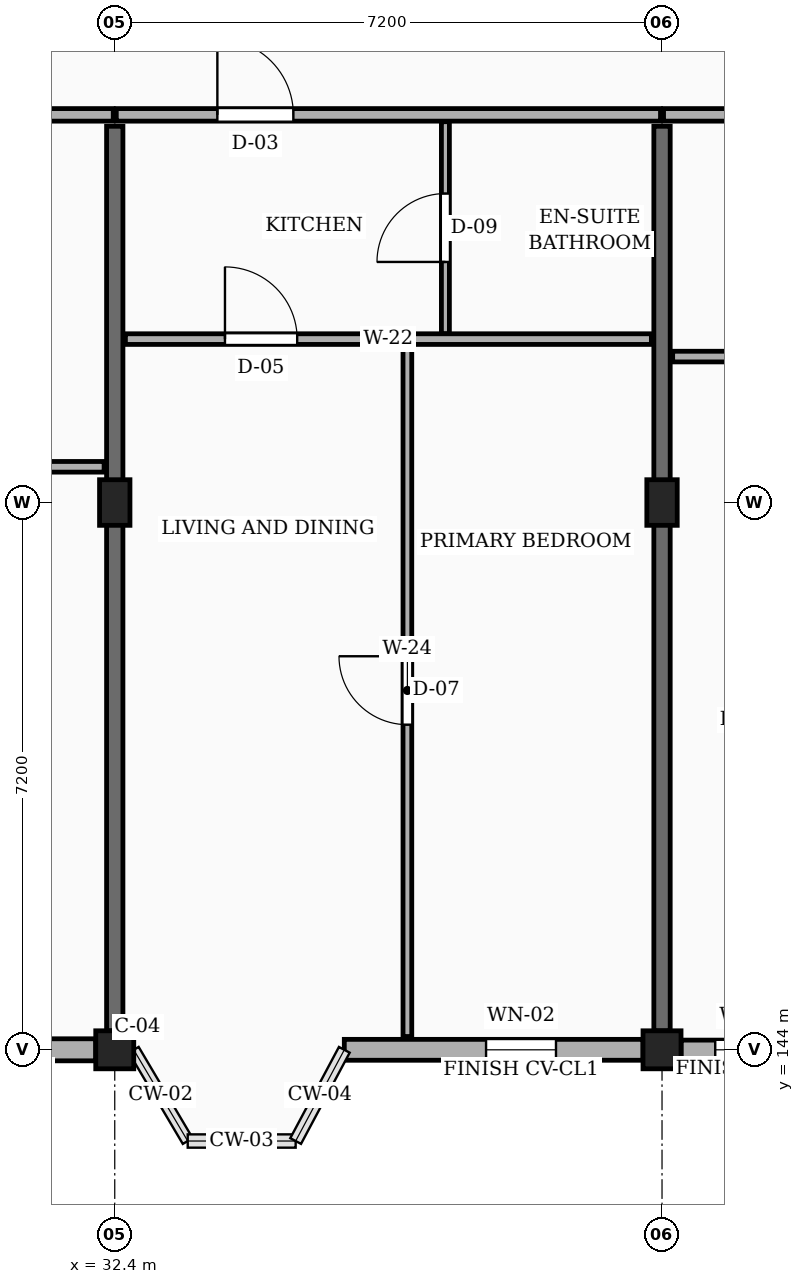
"""IFC4 building model, lengths in metres.
Left out: names, types, materials, properties, quantities, classifications, styles, units other than length and angle.
Written with IfcOpenShell. Run it as: python <this file> out.ifc"""

import sys

from ifc_helpers import new_model, si_unit, direction, frame, frame_2d, origin, origin_2d, place, context, subcontext, project, spatial, rectangle, extrude, element, fill, save


model = new_model("IFC4")
c1 = context("Model", 3, precision=1e-05, world=origin(), true_north=direction((0.0, 1.0)))
c2 = subcontext(c1, "Body", "Model", "MODEL_VIEW")
j1 = project(units=[si_unit("LENGTHUNIT", "METRE"), si_unit("PLANEANGLEUNIT", "RADIAN")], contexts=[c1])
p1 = place(None, origin())
s1 = spatial("IfcSite", under=j1, at=p1, CompositionType="ELEMENT")
p2 = place(p1, origin())
s2 = spatial("IfcBuilding", under=s1, at=p2, CompositionType="ELEMENT")
p3 = place(p2, frame((0.0, 0.0, 26.55)))
s3 = spatial("IfcBuildingStorey", under=s2, at=p3, CompositionType="ELEMENT", Elevation=26.55)
p4 = place(p3, frame((32.4, 144.0, 0.0), z_axis=(0.0, 0.0, 1.0), x_axis=(1.0, 0.0, 0.0)))
e1 = element("IfcColumn", 1, at=p4, inside=s3, PredefinedType="COLUMN", context=c2, shape_type="SweptSolid", body=[
    extrude(rectangle(XDim=0.5, YDim=0.5, at=origin_2d()), origin(), (0.0, 0.0, 1.0), 3.15),
])
p5 = place(p3, frame((32.4, 151.2, 0.0), z_axis=(0.0, 0.0, 1.0), x_axis=(1.0, 0.0, 0.0)))
e2 = element("IfcColumn", 2, at=p5, inside=s3, PredefinedType="COLUMN", context=c2, shape_type="SweptSolid", body=[
    extrude(rectangle(XDim=0.4, YDim=0.6, at=origin_2d()), origin(), (0.0, 0.0, 1.0), 3.15),
])
p6 = place(p3, frame((39.6, 144.0, 0.0), z_axis=(0.0, 0.0, 1.0), x_axis=(1.0, 0.0, 0.0)))
e3 = element("IfcColumn", 3, at=p6, inside=s3, PredefinedType="COLUMN", context=c2, shape_type="SweptSolid", body=[
    extrude(rectangle(XDim=0.5, YDim=0.5, at=origin_2d()), origin(), (0.0, 0.0, 1.0), 3.15),
])
p7 = place(p3, frame((39.6, 151.2, 0.0), z_axis=(0.0, 0.0, 1.0), x_axis=(1.0, 0.0, 0.0)))
e4 = element("IfcColumn", 4, at=p7, inside=s3, PredefinedType="COLUMN", context=c2, shape_type="SweptSolid", body=[
    extrude(rectangle(XDim=0.4, YDim=0.6, at=origin_2d()), origin(), (0.0, 0.0, 1.0), 3.15),
])
for number, where, z_axis, x_axis in (
    (5, (32.4, 144.25, 0.0), (0.0, 0.0, 1.0), (0.0, 1.0, 0.0)),
    (6, (39.6, 144.25, 0.0), (0.0, 0.0, 1.0), (0.0, 1.0, 0.0)),
):
    element("IfcWall", number, at=place(p3, frame(where, z_axis=z_axis, x_axis=x_axis)), inside=s3, PredefinedType="SOLIDWALL", context=c2, shape_type="SweptSolid", body=[
        extrude(rectangle(XDim=11.9, YDim=0.215, at=frame_2d((5.95, 0.0))), origin(), (0.0, 0.0, 1.0), 2.185),
    ])
p8 = place(p3, frame((25.45, 144.0, 0.0), z_axis=(0.0, 0.0, 1.0), x_axis=(1.0, 0.0, 0.0)))
e7 = element("IfcWall", 7, at=p8, inside=s3, PredefinedType="SOLIDWALL", context=c2, shape_type="SweptSolid", body=[
    extrude(rectangle(XDim=6.7, YDim=0.29, at=frame_2d((3.35, 0.0))), origin(), (0.0, 0.0, 1.0), 2.455),
])
p9 = place(p8, frame((0.45, 0.0, 0.78)))
e8 = element("IfcOpeningElement", 8, at=p9, cuts=e7, PredefinedType="OPENING", context=c2, shape_type="SweptSolid", body=[
    extrude(rectangle(XDim=1.45, YDim=1.44, at=frame_2d((0.725, 0.72))), frame((0.0, 0.155, 0.0), z_axis=(0.0, -1.0, 0.0), x_axis=(1.0, 0.0, 0.0)), (0.0, 0.0, 1.0), 0.31),
])
p10 = place(p8, frame((4.65, 0.0, 0.78)))
e9 = element("IfcOpeningElement", 9, at=p10, cuts=e7, PredefinedType="OPENING", context=c2, shape_type="SweptSolid", body=[
    extrude(rectangle(XDim=0.92, YDim=1.15, at=frame_2d((0.46, 0.575))), frame((0.0, 0.155, 0.0), z_axis=(0.0, -1.0, 0.0), x_axis=(1.0, 0.0, 0.0)), (0.0, 0.0, 1.0), 0.31),
])
p11 = place(p3, frame((35.42, 144.0, 0.0), z_axis=(0.0, 0.0, 1.0), x_axis=(1.0, 0.0, 0.0)))
e10 = element("IfcWall", 10, at=p11, inside=s3, PredefinedType="SOLIDWALL", context=c2, shape_type="SweptSolid", body=[
    extrude(rectangle(XDim=3.93, YDim=0.275, at=frame_2d((1.965, 0.0))), origin(), (0.0, 0.0, 1.0), 2.455),
])
p12 = place(p11, frame((1.865, 0.0, 0.78)))
e11 = element("IfcOpeningElement", 11, at=p12, cuts=e10, PredefinedType="OPENING", context=c2, shape_type="SweptSolid", body=[
    extrude(rectangle(XDim=0.92, YDim=1.15, at=frame_2d((0.46, 0.575))), frame((0.0, 0.147, 0.0), z_axis=(0.0, -1.0, 0.0), x_axis=(1.0, 0.0, 0.0)), (0.0, 0.0, 1.0), 0.295),
])
p13 = place(p3, frame((39.85, 144.0, 0.0), z_axis=(0.0, 0.0, 1.0), x_axis=(1.0, 0.0, 0.0)))
e12 = element("IfcWall", 12, at=p13, inside=s3, PredefinedType="SOLIDWALL", context=c2, shape_type="SweptSolid", body=[
    extrude(rectangle(XDim=6.7, YDim=0.255, at=frame_2d((3.35, 0.0))), origin(), (0.0, 0.0, 1.0), 2.455),
])
p14 = place(p13, frame((0.45, 0.0, 0.78)))
e13 = element("IfcOpeningElement", 13, at=p14, cuts=e12, PredefinedType="OPENING", context=c2, shape_type="SweptSolid", body=[
    extrude(rectangle(XDim=1.0, YDim=1.15, at=frame_2d((0.5, 0.575))), frame((0.0, 0.137, 0.0), z_axis=(0.0, -1.0, 0.0), x_axis=(1.0, 0.0, 0.0)), (0.0, 0.0, 1.0), 0.275),
])
p15 = place(p13, frame((4.65, 0.0, 0.78)))
e14 = element("IfcOpeningElement", 14, at=p15, cuts=e12, PredefinedType="OPENING", context=c2, shape_type="SweptSolid", body=[
    extrude(rectangle(XDim=1.16, YDim=1.15, at=frame_2d((0.58, 0.575))), frame((0.0, 0.137, 0.0), z_axis=(0.0, -1.0, 0.0), x_axis=(1.0, 0.0, 0.0)), (0.0, 0.0, 1.0), 0.275),
])
p16 = place(p3, frame((25.22, 156.3, 0.0), z_axis=(0.0, 0.0, 1.0), x_axis=(1.0, 0.0, 0.0)))
e15 = element("IfcWall", 15, at=p16, inside=s3, PredefinedType="PARTITIONING", context=c2, shape_type="SweptSolid", body=[
    extrude(rectangle(XDim=7.16, YDim=0.165, at=frame_2d((3.58, 0.0))), origin(), (0.0, 0.0, 1.0), 2.32),
])
p17 = place(p16, frame((4.78, 0.0, 0.0)))
e16 = element("IfcOpeningElement", 16, at=p17, cuts=e15, PredefinedType="OPENING", context=c2, shape_type="SweptSolid", body=[
    extrude(rectangle(XDim=1.14, YDim=2.18, at=frame_2d((0.57, 1.09))), frame((0.0, 0.093, 0.0), z_axis=(0.0, -1.0, 0.0), x_axis=(1.0, 0.0, 0.0)), (0.0, 0.0, 1.0), 0.185),
])
p18 = place(p3, frame((32.42, 156.3, 0.0), z_axis=(0.0, 0.0, 1.0), x_axis=(1.0, 0.0, 0.0)))
e17 = element("IfcWall", 17, at=p18, inside=s3, PredefinedType="PARTITIONING", context=c2, shape_type="SweptSolid", body=[
    extrude(rectangle(XDim=7.16, YDim=0.165, at=frame_2d((3.58, 0.0))), origin(), (0.0, 0.0, 1.0), 2.32),
])
p19 = place(p18, frame((1.33, 0.0, 0.0)))
e18 = element("IfcOpeningElement", 18, at=p19, cuts=e17, PredefinedType="OPENING", context=c2, shape_type="SweptSolid", body=[
    extrude(rectangle(XDim=1.0, YDim=2.15, at=frame_2d((0.5, 1.075))), frame((0.0, 0.093, 0.0), z_axis=(0.0, -1.0, 0.0), x_axis=(1.0, 0.0, 0.0)), (0.0, 0.0, 1.0), 0.185),
])
p20 = place(p3, frame((39.62, 156.3, 0.0), z_axis=(0.0, 0.0, 1.0), x_axis=(1.0, 0.0, 0.0)))
e19 = element("IfcWall", 19, at=p20, inside=s3, PredefinedType="PARTITIONING", context=c2, shape_type="SweptSolid", body=[
    extrude(rectangle(XDim=7.16, YDim=0.165, at=frame_2d((3.58, 0.0))), origin(), (0.0, 0.0, 1.0), 2.32),
])
p21 = place(p20, frame((1.33, 0.0, 0.0)))
e20 = element("IfcOpeningElement", 20, at=p21, cuts=e19, PredefinedType="OPENING", context=c2, shape_type="SweptSolid", body=[
    extrude(rectangle(XDim=0.94, YDim=2.12, at=frame_2d((0.47, 1.06))), frame((0.0, 0.093, 0.0), z_axis=(0.0, -1.0, 0.0), x_axis=(1.0, 0.0, 0.0)), (0.0, 0.0, 1.0), 0.185),
])
p22 = place(p3, frame((25.34, 151.67, 0.0), z_axis=(0.0, 0.0, 1.0), x_axis=(1.0, 0.0, 0.0)))
e21 = element("IfcWall", 21, at=p22, inside=s3, PredefinedType="PARTITIONING", context=c2, shape_type="SweptSolid", body=[
    extrude(rectangle(XDim=6.92, YDim=0.14, at=frame_2d((3.46, 0.0))), origin(), (0.0, 0.0, 1.0), 2.32),
])
p23 = place(p22, frame((4.66, 0.0, 0.0)))
e22 = element("IfcOpeningElement", 22, at=p23, cuts=e21, PredefinedType="OPENING", context=c2, shape_type="SweptSolid", body=[
    extrude(rectangle(XDim=0.95, YDim=2.1, at=frame_2d((0.475, 1.05))), frame((0.0, 0.08, 0.0), z_axis=(0.0, -1.0, 0.0), x_axis=(1.0, 0.0, 0.0)), (0.0, 0.0, 1.0), 0.16),
])
p24 = place(p3, frame((36.25, 144.175, 0.0), z_axis=(0.0, 0.0, 1.0), x_axis=(0.0, 1.0, 0.0)))
e23 = element("IfcWall", 23, at=p24, inside=s3, PredefinedType="PARTITIONING", context=c2, shape_type="SweptSolid", body=[
    extrude(rectangle(XDim=9.105, YDim=0.115, at=frame_2d((4.552, 0.0))), origin(), (0.0, 0.0, 1.0), 2.32),
])
p25 = place(p24, frame((4.103, 0.0, 0.0)))
e24 = element("IfcOpeningElement", 24, at=p25, cuts=e23, PredefinedType="OPENING", context=c2, shape_type="SweptSolid", body=[
    extrude(rectangle(XDim=0.9, YDim=2.1, at=frame_2d((0.45, 1.05))), frame((0.0, 0.067, 0.0), z_axis=(0.0, -1.0, 0.0), x_axis=(1.0, 0.0, 0.0)), (0.0, 0.0, 1.0), 0.135),
])
p26 = place(p3, frame((36.75, 153.42, 0.0), z_axis=(0.0, 0.0, 1.0), x_axis=(0.0, 1.0, 0.0)))
e25 = element("IfcWall", 25, at=p26, inside=s3, PredefinedType="PARTITIONING", context=c2, shape_type="SweptSolid", body=[
    extrude(rectangle(XDim=2.79, YDim=0.105, at=frame_2d((1.395, 0.0))), origin(), (0.0, 0.0, 1.0), 2.32),
])
p27 = place(p26, frame((0.945, 0.0, 0.0)))
e26 = element("IfcOpeningElement", 26, at=p27, cuts=e25, PredefinedType="OPENING", context=c2, shape_type="SweptSolid", body=[
    extrude(rectangle(XDim=0.9, YDim=2.05, at=frame_2d((0.45, 1.025))), frame((0.0, 0.062, 0.0), z_axis=(0.0, -1.0, 0.0), x_axis=(1.0, 0.0, 0.0)), (0.0, 0.0, 1.0), 0.125),
])
p28 = place(p3, frame((32.54, 153.35, 0.0), z_axis=(0.0, 0.0, 1.0), x_axis=(1.0, 0.0, 0.0)))
e27 = element("IfcWall", 27, at=p28, inside=s3, PredefinedType="PARTITIONING", context=c2, shape_type="SweptSolid", body=[
    extrude(rectangle(XDim=6.92, YDim=0.14, at=frame_2d((3.46, 0.0))), origin(), (0.0, 0.0, 1.0), 2.32),
])
p29 = place(p28, frame((1.31, 0.0, 0.0)))
e28 = element("IfcOpeningElement", 28, at=p29, cuts=e27, PredefinedType="OPENING", context=c2, shape_type="SweptSolid", body=[
    extrude(rectangle(XDim=0.95, YDim=2.1, at=frame_2d((0.475, 1.05))), frame((0.0, 0.08, 0.0), z_axis=(0.0, -1.0, 0.0), x_axis=(1.0, 0.0, 0.0)), (0.0, 0.0, 1.0), 0.16),
])
p30 = place(p3, frame((39.74, 153.12, 0.0), z_axis=(0.0, 0.0, 1.0), x_axis=(1.0, 0.0, 0.0)))
e29 = element("IfcWall", 29, at=p30, inside=s3, PredefinedType="PARTITIONING", context=c2, shape_type="SweptSolid", body=[
    extrude(rectangle(XDim=6.92, YDim=0.14, at=frame_2d((3.46, 0.0))), origin(), (0.0, 0.0, 1.0), 2.32),
])
p31 = place(p30, frame((1.31, 0.0, 0.0)))
e30 = element("IfcOpeningElement", 30, at=p31, cuts=e29, PredefinedType="OPENING", context=c2, shape_type="SweptSolid", body=[
    extrude(rectangle(XDim=0.92, YDim=2.1, at=frame_2d((0.46, 1.05))), frame((0.0, 0.08, 0.0), z_axis=(0.0, -1.0, 0.0), x_axis=(1.0, 0.0, 0.0)), (0.0, 0.0, 1.0), 0.16),
])
p32 = place(p12, origin())
e31 = element("IfcWindow", 31, at=p32, inside=s3, PartitioningType="SINGLE_PANEL", PredefinedType="WINDOW", context=c2, shape_type="SweptSolid", body=[
    extrude(rectangle(XDim=0.92, YDim=1.15, at=frame_2d((0.46, 0.575))), frame((0.0, 0.03, 0.0), z_axis=(0.0, -1.0, 0.0), x_axis=(1.0, 0.0, 0.0)), (0.0, 0.0, 1.0), 0.06),
])
fill(e11, e31)
p33 = place(p14, origin())
e32 = element("IfcWindow", 32, at=p33, inside=s3, PartitioningType="SINGLE_PANEL", PredefinedType="WINDOW", context=c2, shape_type="SweptSolid", body=[
    extrude(rectangle(XDim=1.0, YDim=1.15, at=frame_2d((0.5, 0.575))), frame((0.0, 0.03, 0.0), z_axis=(0.0, -1.0, 0.0), x_axis=(1.0, 0.0, 0.0)), (0.0, 0.0, 1.0), 0.06),
])
fill(e13, e32)
p34 = place(p19, origin())
e33 = element("IfcDoor", 33, at=p34, inside=s3, OperationType="SINGLE_SWING_LEFT", PredefinedType="DOOR", context=c2, shape_type="SweptSolid", body=[
    extrude(rectangle(XDim=1.0, YDim=2.15, at=frame_2d((0.5, 1.075))), frame((0.0, 0.025, 0.0), z_axis=(0.0, -1.0, 0.0), x_axis=(1.0, 0.0, 0.0)), (0.0, 0.0, 1.0), 0.05),
])
fill(e18, e33)
p35 = place(p25, origin())
e34 = element("IfcDoor", 34, at=p35, inside=s3, OperationType="SINGLE_SWING_RIGHT", PredefinedType="DOOR", context=c2, shape_type="SweptSolid", body=[
    extrude(rectangle(XDim=0.9, YDim=2.1, at=frame_2d((0.45, 1.05))), frame((0.0, 0.025, 0.0), z_axis=(0.0, -1.0, 0.0), x_axis=(1.0, 0.0, 0.0)), (0.0, 0.0, 1.0), 0.05),
])
fill(e24, e34)
p36 = place(p27, origin())
e35 = element("IfcDoor", 35, at=p36, inside=s3, OperationType="SINGLE_SWING_LEFT", PredefinedType="DOOR", context=c2, shape_type="SweptSolid", body=[
    extrude(rectangle(XDim=0.9, YDim=2.05, at=frame_2d((0.45, 1.025))), frame((0.0, 0.025, 0.0), z_axis=(0.0, -1.0, 0.0), x_axis=(1.0, 0.0, 0.0)), (0.0, 0.0, 1.0), 0.05),
])
fill(e26, e35)
p37 = place(p29, origin())
e36 = element("IfcDoor", 36, at=p37, inside=s3, OperationType="SINGLE_SWING_LEFT", PredefinedType="DOOR", context=c2, shape_type="SweptSolid", body=[
    extrude(rectangle(XDim=0.95, YDim=2.1, at=frame_2d((0.475, 1.05))), frame((0.0, 0.025, 0.0), z_axis=(0.0, -1.0, 0.0), x_axis=(1.0, 0.0, 0.0)), (0.0, 0.0, 1.0), 0.05),
])
fill(e28, e36)
save(model, sys.argv[1])
